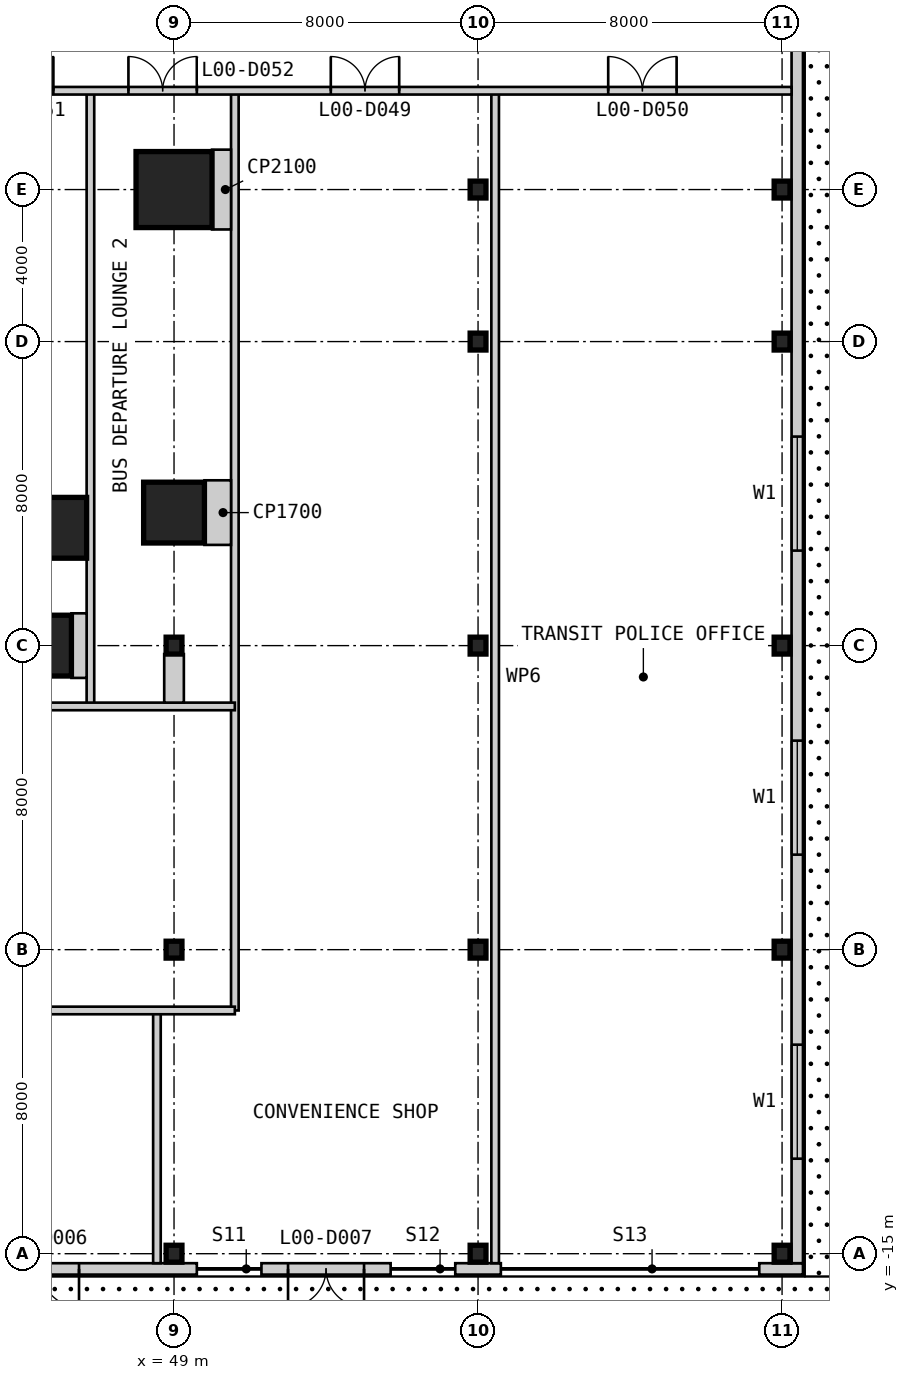
"""IFC4 building model, lengths in metres.
Left out: names, types, materials, properties, quantities, classifications, styles, units other than length and angle.
Written with IfcOpenShell. Run it as: python <this file> out.ifc"""

import sys

from ifc_helpers import new_model, si_unit, direction, frame, frame_2d, origin, origin_2d, place, context, subcontext, project, spatial, rectangle, i_section, extrude, element, fill, save


model = new_model("IFC4")
c1 = context("Model", 3, precision=1e-05, world=origin(), true_north=direction((0.0, 1.0)))
c2 = subcontext(c1, "Body", "Model", "MODEL_VIEW")
j1 = project(units=[si_unit("LENGTHUNIT", "METRE"), si_unit("PLANEANGLEUNIT", "RADIAN")], contexts=[c1])
p1 = place(None, origin())
s1 = spatial("IfcSite", under=j1, at=p1, CompositionType="ELEMENT")
p2 = place(p1, origin())
s2 = spatial("IfcBuilding", under=s1, at=p2, CompositionType="ELEMENT")
p3 = place(p2, origin())
s3 = spatial("IfcBuildingStorey", under=s2, at=p3, CompositionType="ELEMENT", Elevation=0.0)
for number, where, z_axis, x_axis in (
    (1, (45.5, 1.0, 0.0), (0.0, 0.0, 1.0), (1.0, 0.0, 0.0)),
    (2, (45.9, 4.1, 0.0), (0.0, 0.0, 1.0), (1.0, 0.0, 0.0)),
    (3, (49.0, 4.5, 0.0), (0.0, 0.0, 1.0), (1.0, 0.0, 0.0)),
):
    element("IfcColumn", number, at=place(p3, frame(where, z_axis=z_axis, x_axis=x_axis)), inside=s3, PredefinedType="COLUMN", context=c2, shape_type="SweptSolid", body=[
        extrude(rectangle(XDim=1.6, YDim=1.6, at=origin_2d()), origin(), (0.0, 0.0, 1.0), 7.0),
    ])
p4 = place(p3, frame((49.0, 13.0, 0.0), z_axis=(0.0, 0.0, 1.0), x_axis=(1.0, 0.0, 0.0)))
e4 = element("IfcColumn", 4, at=p4, inside=s3, PredefinedType="COLUMN", context=c2, shape_type="SweptSolid", body=[
    extrude(rectangle(XDim=2.0, YDim=2.0, at=origin_2d()), origin(), (0.0, 0.0, 1.0), 7.0),
])
p5 = place(p3, frame((49.0, -15.0, -0.3), z_axis=(0.0, 0.0, 1.0), x_axis=(1.0, 0.0, 0.0)))
e5 = element("IfcColumn", 5, at=p5, inside=s3, PredefinedType="COLUMN", context=c2, shape_type="SweptSolid", body=[
    extrude(i_section(OverallWidth=0.417, OverallDepth=0.445, WebThickness=0.039, FlangeThickness=0.063, at=origin_2d()), origin(), (0.0, 0.0, 1.0), 7.3),
])
for number, where, z_axis, x_axis in (
    (6, (49.0, -7.0, 0.0), (0.0, 0.0, 1.0), (1.0, 0.0, 0.0)),
    (7, (49.0, 1.0, 0.0), (0.0, 0.0, 1.0), (1.0, 0.0, 0.0)),
):
    element("IfcColumn", number, at=place(p3, frame(where, z_axis=z_axis, x_axis=x_axis)), inside=s3, PredefinedType="COLUMN", context=c2, shape_type="SweptSolid", body=[
        extrude(i_section(OverallWidth=0.417, OverallDepth=0.445, WebThickness=0.039, FlangeThickness=0.063, at=origin_2d()), origin(), (0.0, 0.0, 1.0), 7.0),
    ])
p6 = place(p3, frame((57.0, -15.0, -0.3), z_axis=(0.0, 0.0, 1.0), x_axis=(1.0, 0.0, 0.0)))
e8 = element("IfcColumn", 8, at=p6, inside=s3, PredefinedType="COLUMN", context=c2, shape_type="SweptSolid", body=[
    extrude(i_section(OverallWidth=0.417, OverallDepth=0.445, WebThickness=0.039, FlangeThickness=0.063, at=origin_2d()), origin(), (0.0, 0.0, 1.0), 7.3),
])
for number, where, z_axis, x_axis in (
    (9, (57.0, -7.0, 0.0), (0.0, 0.0, 1.0), (1.0, 0.0, 0.0)),
    (10, (57.0, 1.0, 0.0), (0.0, 0.0, 1.0), (1.0, 0.0, 0.0)),
    (11, (57.0, 9.0, 0.0), (0.0, 0.0, 1.0), (1.0, 0.0, 0.0)),
    (12, (57.0, 13.0, 0.0), (0.0, 0.0, 1.0), (1.0, 0.0, 0.0)),
):
    element("IfcColumn", number, at=place(p3, frame(where, z_axis=z_axis, x_axis=x_axis)), inside=s3, PredefinedType="COLUMN", context=c2, shape_type="SweptSolid", body=[
        extrude(i_section(OverallWidth=0.417, OverallDepth=0.445, WebThickness=0.039, FlangeThickness=0.063, at=origin_2d()), origin(), (0.0, 0.0, 1.0), 7.0),
    ])
for number, where, z_axis, x_axis in (
    (13, (65.0, -15.0, -0.3), (0.0, 0.0, 1.0), (1.0, 0.0, 0.0)),
    (14, (65.0, -7.0, -0.3), (0.0, 0.0, 1.0), (1.0, 0.0, 0.0)),
    (15, (65.0, 1.0, -0.3), (0.0, 0.0, 1.0), (1.0, 0.0, 0.0)),
    (16, (65.0, 9.0, -0.3), (0.0, 0.0, 1.0), (1.0, 0.0, 0.0)),
    (17, (65.0, 13.0, -0.3), (0.0, 0.0, 1.0), (1.0, 0.0, 0.0)),
):
    element("IfcColumn", number, at=place(p3, frame(where, z_axis=z_axis, x_axis=x_axis)), inside=s3, PredefinedType="COLUMN", context=c2, shape_type="SweptSolid", body=[
        extrude(i_section(OverallWidth=0.417, OverallDepth=0.445, WebThickness=0.039, FlangeThickness=0.063, at=origin_2d()), origin(), (0.0, 0.0, 1.0), 7.3),
    ])
p7 = place(p3, frame((41.4, -15.4, 0.0), z_axis=(0.0, 0.0, 1.0), x_axis=(1.0, 0.0, 0.0)))
e18 = element("IfcWall", 18, at=p7, inside=s3, PredefinedType="SOLIDWALL", context=c2, shape_type="SweptSolid", body=[
    extrude(rectangle(XDim=8.2, YDim=0.3, at=frame_2d((4.1, 0.0))), origin(), (0.0, 0.0, 1.0), 6.7),
])
p8 = place(p7, frame((3.1, 0.0, 0.0)))
e19 = element("IfcOpeningElement", 19, at=p8, cuts=e18, PredefinedType="OPENING", context=c2, shape_type="SweptSolid", body=[
    extrude(rectangle(XDim=2.0, YDim=3.0, at=frame_2d((1.0, 1.5))), frame((0.0, 0.16, 0.0), z_axis=(0.0, -1.0, 0.0), x_axis=(1.0, 0.0, 0.0)), (0.0, 0.0, 1.0), 0.32),
])
p9 = place(p3, frame((51.3, -15.4, 0.0), z_axis=(0.0, 0.0, 1.0), x_axis=(1.0, 0.0, 0.0)))
e20 = element("IfcWall", 20, at=p9, inside=s3, PredefinedType="SOLIDWALL", context=c2, shape_type="SweptSolid", body=[
    extrude(rectangle(XDim=3.4, YDim=0.3, at=frame_2d((1.7, 0.0))), origin(), (0.0, 0.0, 1.0), 6.7),
])
p10 = place(p9, frame((0.7, 0.0, 0.0)))
e21 = element("IfcOpeningElement", 21, at=p10, cuts=e20, PredefinedType="OPENING", context=c2, shape_type="SweptSolid", body=[
    extrude(rectangle(XDim=2.0, YDim=3.0, at=frame_2d((1.0, 1.5))), frame((0.0, 0.16, 0.0), z_axis=(0.0, -1.0, 0.0), x_axis=(1.0, 0.0, 0.0)), (0.0, 0.0, 1.0), 0.32),
])
p11 = place(p3, frame((56.4, -15.4, 0.0), z_axis=(0.0, 0.0, 1.0), x_axis=(1.0, 0.0, 0.0)))
e22 = element("IfcWall", 22, at=p11, inside=s3, PredefinedType="SOLIDWALL", context=c2, shape_type="SweptSolid", body=[
    extrude(rectangle(XDim=1.2, YDim=0.3, at=frame_2d((0.6, 0.0))), origin(), (0.0, 0.0, 1.0), 6.7),
])
p12 = place(p3, frame((64.4, -15.4, 0.0), z_axis=(0.0, 0.0, 1.0), x_axis=(1.0, 0.0, 0.0)))
e23 = element("IfcWall", 23, at=p12, inside=s3, PredefinedType="SOLIDWALL", context=c2, shape_type="SweptSolid", body=[
    extrude(rectangle(XDim=1.15, YDim=0.3, at=frame_2d((0.575, 0.0))), origin(), (0.0, 0.0, 1.0), 6.7),
])
p13 = place(p3, frame((65.4, -15.25, 0.0), z_axis=(0.0, 0.0, 1.0), x_axis=(0.0, 1.0, 0.0)))
e24 = element("IfcWall", 24, at=p13, inside=s3, PredefinedType="SOLIDWALL", context=c2, shape_type="SweptSolid", body=[
    extrude(rectangle(XDim=80.5, YDim=0.3, at=frame_2d((40.25, 0.0))), origin(), (0.0, 0.0, 1.0), 6.7),
])
p14 = place(p13, frame((33.35, 0.0, 0.0)))
e25 = element("IfcOpeningElement", 25, at=p14, cuts=e24, PredefinedType="OPENING", context=c2, shape_type="SweptSolid", body=[
    extrude(rectangle(XDim=1.8, YDim=2.4, at=frame_2d((0.9, 1.2))), frame((0.0, 0.16, 0.0), z_axis=(0.0, -1.0, 0.0), x_axis=(1.0, 0.0, 0.0)), (0.0, 0.0, 1.0), 0.32),
])
p15 = place(p13, frame((45.35, 0.0, 0.0)))
e26 = element("IfcOpeningElement", 26, at=p15, cuts=e24, PredefinedType="OPENING", context=c2, shape_type="SweptSolid", body=[
    extrude(rectangle(XDim=1.8, YDim=2.4, at=frame_2d((0.9, 1.2))), frame((0.0, 0.16, 0.0), z_axis=(0.0, -1.0, 0.0), x_axis=(1.0, 0.0, 0.0)), (0.0, 0.0, 1.0), 0.32),
])
p16 = place(p13, frame((2.75, 0.0, 0.9)))
e27 = element("IfcOpeningElement", 27, at=p16, cuts=e24, PredefinedType="OPENING", context=c2, shape_type="SweptSolid", body=[
    extrude(rectangle(XDim=3.0, YDim=2.4, at=frame_2d((1.5, 1.2))), frame((0.0, 0.16, 0.0), z_axis=(0.0, -1.0, 0.0), x_axis=(1.0, 0.0, 0.0)), (0.0, 0.0, 1.0), 0.32),
])
p17 = place(p13, frame((10.75, 0.0, 0.9)))
e28 = element("IfcOpeningElement", 28, at=p17, cuts=e24, PredefinedType="OPENING", context=c2, shape_type="SweptSolid", body=[
    extrude(rectangle(XDim=3.0, YDim=2.4, at=frame_2d((1.5, 1.2))), frame((0.0, 0.16, 0.0), z_axis=(0.0, -1.0, 0.0), x_axis=(1.0, 0.0, 0.0)), (0.0, 0.0, 1.0), 0.32),
])
p18 = place(p13, frame((18.75, 0.0, 0.9)))
e29 = element("IfcOpeningElement", 29, at=p18, cuts=e24, PredefinedType="OPENING", context=c2, shape_type="SweptSolid", body=[
    extrude(rectangle(XDim=3.0, YDim=2.4, at=frame_2d((1.5, 1.2))), frame((0.0, 0.16, 0.0), z_axis=(0.0, -1.0, 0.0), x_axis=(1.0, 0.0, 0.0)), (0.0, 0.0, 1.0), 0.32),
])
p19 = place(p13, frame((53.25, 0.0, 0.9)))
e30 = element("IfcOpeningElement", 30, at=p19, cuts=e24, PredefinedType="OPENING", context=c2, shape_type="SweptSolid", body=[
    extrude(rectangle(XDim=3.0, YDim=2.4, at=frame_2d((1.5, 1.2))), frame((0.0, 0.16, 0.0), z_axis=(0.0, -1.0, 0.0), x_axis=(1.0, 0.0, 0.0)), (0.0, 0.0, 1.0), 0.32),
])
p20 = place(p13, frame((59.25, 0.0, 0.9)))
e31 = element("IfcOpeningElement", 31, at=p20, cuts=e24, PredefinedType="OPENING", context=c2, shape_type="SweptSolid", body=[
    extrude(rectangle(XDim=3.0, YDim=2.4, at=frame_2d((1.5, 1.2))), frame((0.0, 0.16, 0.0), z_axis=(0.0, -1.0, 0.0), x_axis=(1.0, 0.0, 0.0)), (0.0, 0.0, 1.0), 0.32),
])
p21 = place(p13, frame((66.75, 0.0, 0.9)))
e32 = element("IfcOpeningElement", 32, at=p21, cuts=e24, PredefinedType="OPENING", context=c2, shape_type="SweptSolid", body=[
    extrude(rectangle(XDim=3.0, YDim=2.4, at=frame_2d((1.5, 1.2))), frame((0.0, 0.16, 0.0), z_axis=(0.0, -1.0, 0.0), x_axis=(1.0, 0.0, 0.0)), (0.0, 0.0, 1.0), 0.32),
])
p22 = place(p13, frame((74.75, 0.0, 0.9)))
e33 = element("IfcOpeningElement", 33, at=p22, cuts=e24, PredefinedType="OPENING", context=c2, shape_type="SweptSolid", body=[
    extrude(rectangle(XDim=3.0, YDim=2.4, at=frame_2d((1.5, 1.2))), frame((0.0, 0.16, 0.0), z_axis=(0.0, -1.0, 0.0), x_axis=(1.0, 0.0, 0.0)), (0.0, 0.0, 1.0), 0.32),
])
p23 = place(p3, frame((46.8, -0.6, 0.0), z_axis=(0.0, 0.0, 1.0), x_axis=(0.0, 1.0, 0.0)))
e34 = element("IfcWall", 34, at=p23, inside=s3, PredefinedType="PARTITIONING", context=c2, shape_type="SweptSolid", body=[
    extrude(rectangle(XDim=16.2, YDim=0.2, at=frame_2d((8.1, 0.0))), origin(), (0.0, 0.0, 1.0), 6.7),
])
p24 = place(p3, frame((48.55, -15.25, 0.0), z_axis=(0.0, 0.0, 1.0), x_axis=(0.0, 1.0, 0.0)))
e35 = element("IfcWall", 35, at=p24, inside=s3, PredefinedType="PARTITIONING", context=c2, shape_type="SweptSolid", body=[
    extrude(rectangle(XDim=6.65, YDim=0.2, at=frame_2d((3.325, 0.0))), origin(), (0.0, 0.0, 1.0), 6.7),
])
p25 = place(p3, frame((50.6, -8.6, 0.0), z_axis=(0.0, 0.0, 1.0), x_axis=(0.0, 1.0, 0.0)))
e36 = element("IfcWall", 36, at=p25, inside=s3, PredefinedType="PARTITIONING", context=c2, shape_type="SweptSolid", body=[
    extrude(rectangle(XDim=24.2, YDim=0.2, at=frame_2d((12.1, 0.0))), origin(), (0.0, 0.0, 1.0), 6.7),
])
p26 = place(p3, frame((57.45, -15.25, 0.0), z_axis=(0.0, 0.0, 1.0), x_axis=(0.0, 1.0, 0.0)))
e37 = element("IfcWall", 37, at=p26, inside=s3, PredefinedType="PARTITIONING", context=c2, shape_type="SweptSolid", body=[
    extrude(rectangle(XDim=30.85, YDim=0.2, at=frame_2d((15.425, 0.0))), origin(), (0.0, 0.0, 1.0), 6.7),
])
for number, where, z_axis, x_axis in (
    (38, (34.4, -8.6, 0.0), (0.0, 0.0, 1.0), (1.0, 0.0, 0.0)),
    (39, (34.4, -0.6, 0.0), (0.0, 0.0, 1.0), (1.0, 0.0, 0.0)),
):
    element("IfcWall", number, at=place(p3, frame(where, z_axis=z_axis, x_axis=x_axis)), inside=s3, PredefinedType="PARTITIONING", context=c2, shape_type="SweptSolid", body=[
        extrude(rectangle(XDim=16.2, YDim=0.2, at=frame_2d((8.1, 0.0))), origin(), (0.0, 0.0, 1.0), 6.7),
    ])
p27 = place(p3, frame((43.0, 15.6, 0.0), z_axis=(0.0, 0.0, 1.0), x_axis=(1.0, 0.0, 0.0)))
e40 = element("IfcWall", 40, at=p27, inside=s3, PredefinedType="PARTITIONING", context=c2, shape_type="SweptSolid", body=[
    extrude(rectangle(XDim=22.25, YDim=0.2, at=frame_2d((11.125, 0.0))), origin(), (0.0, 0.0, 1.0), 6.7),
])
p28 = place(p27, frame((10.125, 0.0, 0.0)))
e41 = element("IfcOpeningElement", 41, at=p28, cuts=e40, PredefinedType="OPENING", context=c2, shape_type="SweptSolid", body=[
    extrude(rectangle(XDim=1.8, YDim=2.4, at=frame_2d((0.9, 1.2))), frame((0.0, 0.11, 0.0), z_axis=(0.0, -1.0, 0.0), x_axis=(1.0, 0.0, 0.0)), (0.0, 0.0, 1.0), 0.22),
])
p29 = place(p27, frame((17.425, 0.0, 0.0)))
e42 = element("IfcOpeningElement", 42, at=p29, cuts=e40, PredefinedType="OPENING", context=c2, shape_type="SweptSolid", body=[
    extrude(rectangle(XDim=1.8, YDim=2.4, at=frame_2d((0.9, 1.2))), frame((0.0, 0.11, 0.0), z_axis=(0.0, -1.0, 0.0), x_axis=(1.0, 0.0, 0.0)), (0.0, 0.0, 1.0), 0.22),
])
p30 = place(p27, frame((1.025, 0.0, 0.0)))
e43 = element("IfcOpeningElement", 43, at=p30, cuts=e40, PredefinedType="OPENING", context=c2, shape_type="SweptSolid", body=[
    extrude(rectangle(XDim=1.8, YDim=2.4, at=frame_2d((0.9, 1.2))), frame((0.0, 0.11, 0.0), z_axis=(0.0, -1.0, 0.0), x_axis=(1.0, 0.0, 0.0)), (0.0, 0.0, 1.0), 0.22),
])
p31 = place(p27, frame((4.8, 0.0, 0.0)))
e44 = element("IfcOpeningElement", 44, at=p31, cuts=e40, PredefinedType="OPENING", context=c2, shape_type="SweptSolid", body=[
    extrude(rectangle(XDim=1.8, YDim=2.4, at=frame_2d((0.9, 1.2))), frame((0.0, 0.11, 0.0), z_axis=(0.0, -1.0, 0.0), x_axis=(1.0, 0.0, 0.0)), (0.0, 0.0, 1.0), 0.22),
])
p32 = place(p3, frame((46.7, 1.0, 0.0), z_axis=(0.0, 0.0, 1.0), x_axis=(-1.0, 0.0, 0.0)))
e45 = element("IfcWall", 45, at=p32, inside=s3, PredefinedType="PARTITIONING", context=c2, shape_type="SweptSolid", body=[
    extrude(rectangle(XDim=0.4, YDim=1.7, at=frame_2d((0.2, 0.0))), origin(), (0.0, 0.0, 1.0), 6.7),
])
p33 = place(p3, frame((50.5, 4.5, 0.0), z_axis=(0.0, 0.0, 1.0), x_axis=(-1.0, 0.0, 0.0)))
e46 = element("IfcWall", 46, at=p33, inside=s3, PredefinedType="PARTITIONING", context=c2, shape_type="SweptSolid", body=[
    extrude(rectangle(XDim=0.7, YDim=1.7, at=frame_2d((0.35, 0.0))), origin(), (0.0, 0.0, 1.0), 6.7),
])
p34 = place(p3, frame((50.5, 13.0, 0.0), z_axis=(0.0, 0.0, 1.0), x_axis=(-1.0, 0.0, 0.0)))
e47 = element("IfcWall", 47, at=p34, inside=s3, PredefinedType="PARTITIONING", context=c2, shape_type="SweptSolid", body=[
    extrude(rectangle(XDim=0.5, YDim=2.1, at=frame_2d((0.25, 0.0))), origin(), (0.0, 0.0, 1.0), 6.7),
])
p35 = place(p3, frame((49.0, -0.5, 0.0), z_axis=(0.0, 0.0, 1.0), x_axis=(0.0, 1.0, 0.0)))
e48 = element("IfcWall", 48, at=p35, inside=s3, PredefinedType="PARTITIONING", context=c2, shape_type="SweptSolid", body=[
    extrude(rectangle(XDim=1.278, YDim=0.517, at=frame_2d((0.639, 0.0))), origin(), (0.0, 0.0, 1.0), 5.954),
])
p36 = place(p8, frame((2.0, 0.0, 0.0), z_axis=(0.0, 0.0, 1.0), x_axis=(-1.0, 0.0, 0.0)))
e49 = element("IfcDoor", 49, at=p36, inside=s3, OperationType="DOUBLE_DOOR_SINGLE_SWING", PredefinedType="DOOR", context=c2, shape_type="SweptSolid", body=[
    extrude(rectangle(XDim=2.0, YDim=3.0, at=frame_2d((1.0, 1.5))), frame((0.0, 0.025, 0.0), z_axis=(0.0, -1.0, 0.0), x_axis=(1.0, 0.0, 0.0)), (0.0, 0.0, 1.0), 0.05),
])
fill(e19, e49)
p37 = place(p10, frame((2.0, 0.0, 0.0), z_axis=(0.0, 0.0, 1.0), x_axis=(-1.0, 0.0, 0.0)))
e50 = element("IfcDoor", 50, at=p37, inside=s3, OperationType="DOUBLE_DOOR_SINGLE_SWING", PredefinedType="DOOR", context=c2, shape_type="SweptSolid", body=[
    extrude(rectangle(XDim=2.0, YDim=3.0, at=frame_2d((1.0, 1.5))), frame((0.0, 0.025, 0.0), z_axis=(0.0, -1.0, 0.0), x_axis=(1.0, 0.0, 0.0)), (0.0, 0.0, 1.0), 0.05),
])
fill(e21, e50)
p38 = place(p16, origin())
e51 = element("IfcWindow", 51, at=p38, inside=s3, PartitioningType="SINGLE_PANEL", PredefinedType="WINDOW", context=c2, shape_type="SweptSolid", body=[
    extrude(rectangle(XDim=3.0, YDim=2.4, at=frame_2d((1.5, 1.2))), frame((0.0, 0.03, 0.0), z_axis=(0.0, -1.0, 0.0), x_axis=(1.0, 0.0, 0.0)), (0.0, 0.0, 1.0), 0.06),
])
fill(e27, e51)
p39 = place(p17, origin())
e52 = element("IfcWindow", 52, at=p39, inside=s3, PartitioningType="SINGLE_PANEL", PredefinedType="WINDOW", context=c2, shape_type="SweptSolid", body=[
    extrude(rectangle(XDim=3.0, YDim=2.4, at=frame_2d((1.5, 1.2))), frame((0.0, 0.03, 0.0), z_axis=(0.0, -1.0, 0.0), x_axis=(1.0, 0.0, 0.0)), (0.0, 0.0, 1.0), 0.06),
])
fill(e28, e52)
p40 = place(p18, origin())
e53 = element("IfcWindow", 53, at=p40, inside=s3, PartitioningType="SINGLE_PANEL", PredefinedType="WINDOW", context=c2, shape_type="SweptSolid", body=[
    extrude(rectangle(XDim=3.0, YDim=2.4, at=frame_2d((1.5, 1.2))), frame((0.0, 0.03, 0.0), z_axis=(0.0, -1.0, 0.0), x_axis=(1.0, 0.0, 0.0)), (0.0, 0.0, 1.0), 0.06),
])
fill(e29, e53)
p41 = place(p28, origin())
e54 = element("IfcDoor", 54, at=p41, inside=s3, OperationType="DOUBLE_DOOR_SINGLE_SWING", PredefinedType="DOOR", context=c2, shape_type="SweptSolid", body=[
    extrude(rectangle(XDim=1.8, YDim=2.4, at=frame_2d((0.9, 1.2))), frame((0.0, 0.025, 0.0), z_axis=(0.0, -1.0, 0.0), x_axis=(1.0, 0.0, 0.0)), (0.0, 0.0, 1.0), 0.05),
])
fill(e41, e54)
p42 = place(p29, origin())
e55 = element("IfcDoor", 55, at=p42, inside=s3, OperationType="DOUBLE_DOOR_SINGLE_SWING", PredefinedType="DOOR", context=c2, shape_type="SweptSolid", body=[
    extrude(rectangle(XDim=1.8, YDim=2.4, at=frame_2d((0.9, 1.2))), frame((0.0, 0.025, 0.0), z_axis=(0.0, -1.0, 0.0), x_axis=(1.0, 0.0, 0.0)), (0.0, 0.0, 1.0), 0.05),
])
fill(e42, e55)
p43 = place(p30, origin())
e56 = element("IfcDoor", 56, at=p43, inside=s3, OperationType="DOUBLE_DOOR_SINGLE_SWING", PredefinedType="DOOR", context=c2, shape_type="SweptSolid", body=[
    extrude(rectangle(XDim=1.8, YDim=2.4, at=frame_2d((0.9, 1.2))), frame((0.0, 0.025, 0.0), z_axis=(0.0, -1.0, 0.0), x_axis=(1.0, 0.0, 0.0)), (0.0, 0.0, 1.0), 0.05),
])
fill(e43, e56)
p44 = place(p31, origin())
e57 = element("IfcDoor", 57, at=p44, inside=s3, OperationType="DOUBLE_DOOR_SINGLE_SWING", PredefinedType="DOOR", context=c2, shape_type="SweptSolid", body=[
    extrude(rectangle(XDim=1.8, YDim=2.4, at=frame_2d((0.9, 1.2))), frame((0.0, 0.025, 0.0), z_axis=(0.0, -1.0, 0.0), x_axis=(1.0, 0.0, 0.0)), (0.0, 0.0, 1.0), 0.05),
])
fill(e44, e57)
save(model, sys.argv[1])
